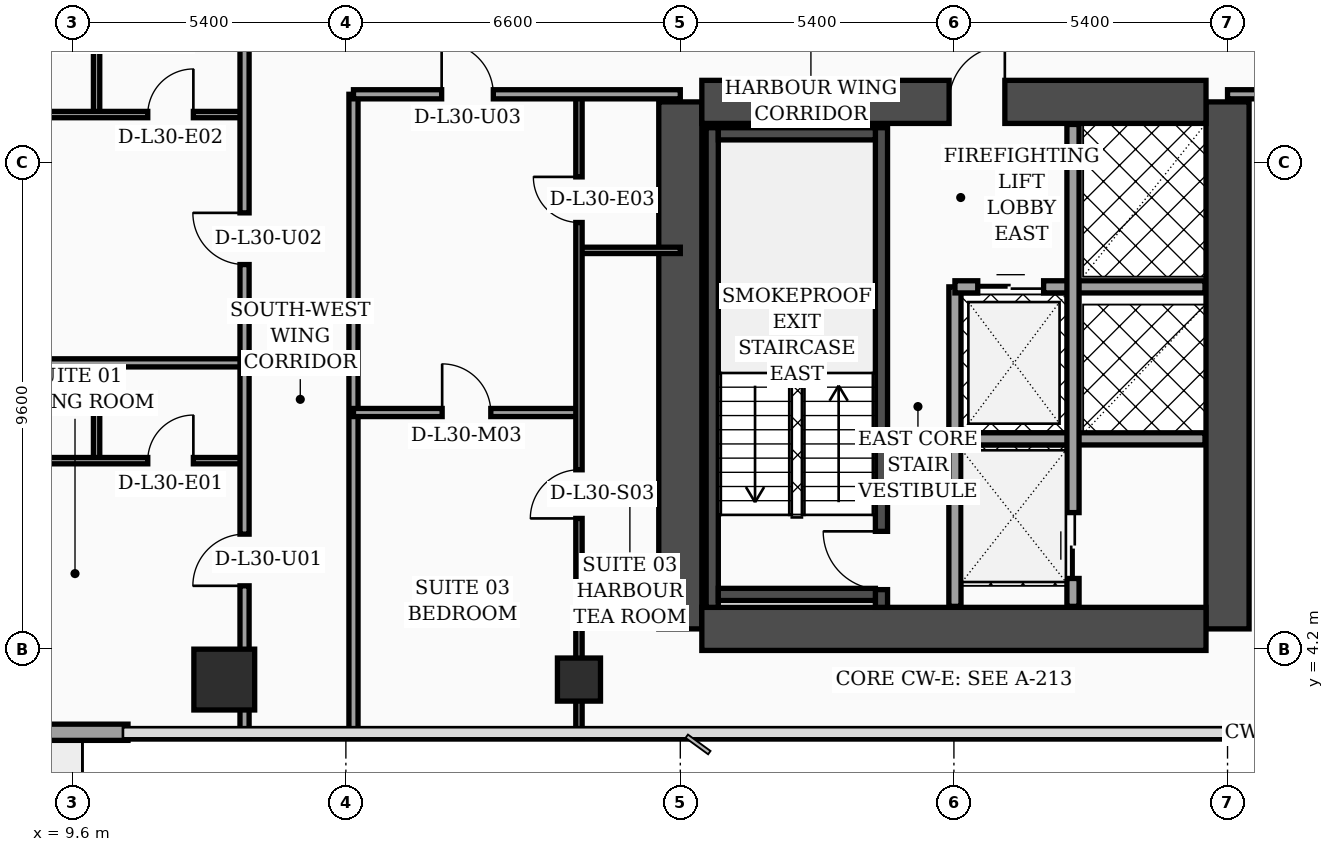
"""IFC4 building model, lengths in metres.
Left out: names, types, materials, properties, quantities, classifications, styles, units other than length and angle.
Written with IfcOpenShell. Run it as: python <this file> out.ifc"""

import sys

from ifc_helpers import new_model, si_unit, direction, frame, frame_2d, origin, origin_2d, place, context, subcontext, project, spatial, rectangle, hollow_rectangle, extrude, element, fill, save


model = new_model("IFC4")
c1 = context("Model", 3, precision=1e-05, world=origin(), true_north=direction((0.0, 1.0)))
c2 = subcontext(c1, "Body", "Model", "MODEL_VIEW")
j1 = project(units=[si_unit("LENGTHUNIT", "METRE"), si_unit("PLANEANGLEUNIT", "RADIAN")], contexts=[c1])
p1 = place(None, origin())
s1 = spatial("IfcSite", under=j1, at=p1, CompositionType="ELEMENT")
p2 = place(p1, origin())
s2 = spatial("IfcBuilding", under=s1, at=p2, CompositionType="ELEMENT")
p3 = place(p2, frame((0.0, 0.0, 124.0)))
s3 = spatial("IfcBuildingStorey", under=s2, at=p3, CompositionType="ELEMENT", Elevation=124.0)
for number, where, z_axis, x_axis in (
    (1, (21.6, 4.6, 0.0), (0.0, 0.0, 1.0), (0.0, 1.0, 0.0)),
    (2, (32.4, 4.6, 0.0), (0.0, 0.0, 1.0), (0.0, 1.0, 0.0)),
):
    element("IfcWall", number, at=place(p3, frame(where, z_axis=z_axis, x_axis=x_axis)), inside=s3, PredefinedType="SHEAR", context=c2, shape_type="SweptSolid", body=[
        extrude(rectangle(XDim=10.4, YDim=0.85, at=frame_2d((5.2, 0.0))), origin(), (0.0, 0.0, 1.0), 3.56),
    ])
p4 = place(p3, frame((22.025, 15.0, 0.0), z_axis=(0.0, 0.0, 1.0), x_axis=(1.0, 0.0, 0.0)))
e3 = element("IfcWall", 3, at=p4, inside=s3, PredefinedType="SHEAR", context=c2, shape_type="SweptSolid", body=[
    extrude(rectangle(XDim=9.95, YDim=0.85, at=frame_2d((4.975, 0.0))), origin(), (0.0, 0.0, 1.0), 3.56),
])
p5 = place(p4, frame((4.88, 0.0, 0.0)))
e4 = element("IfcOpeningElement", 4, at=p5, cuts=e3, PredefinedType="OPENING", context=c2, shape_type="SweptSolid", body=[
    extrude(rectangle(XDim=1.1, YDim=2.2, at=frame_2d((0.55, 1.1))), frame((0.0, 0.435, 0.0), z_axis=(0.0, -1.0, 0.0), x_axis=(1.0, 0.0, 0.0)), (0.0, 0.0, 1.0), 0.87),
])
p6 = place(p3, frame((22.025, 4.6, 0.0), z_axis=(0.0, 0.0, 1.0), x_axis=(1.0, 0.0, 0.0)))
e5 = element("IfcWall", 5, at=p6, inside=s3, PredefinedType="SHEAR", context=c2, shape_type="SweptSolid", body=[
    extrude(rectangle(XDim=9.95, YDim=0.85, at=frame_2d((4.975, 0.0))), origin(), (0.0, 0.0, 1.0), 3.56),
])
p7 = place(p3, frame((22.23, 5.025, 0.0), z_axis=(0.0, 0.0, 1.0), x_axis=(0.0, 1.0, 0.0)))
e6 = element("IfcWall", 6, at=p7, inside=s3, PredefinedType="SOLIDWALL", context=c2, shape_type="SweptSolid", body=[
    extrude(rectangle(XDim=9.465, YDim=0.24, at=frame_2d((4.732, 0.0))), origin(), (0.0, 0.0, 1.0), 3.56),
])
p8 = place(p3, frame((25.57, 5.025, 0.0), z_axis=(0.0, 0.0, 1.0), x_axis=(0.0, 1.0, 0.0)))
e7 = element("IfcWall", 7, at=p8, inside=s3, PredefinedType="SOLIDWALL", context=c2, shape_type="SweptSolid", body=[
    extrude(rectangle(XDim=9.465, YDim=0.24, at=frame_2d((4.732, 0.0))), origin(), (0.0, 0.0, 1.0), 3.56),
])
p9 = place(p8, frame((0.35, 0.0, 0.0)))
e8 = element("IfcOpeningElement", 8, at=p9, cuts=e7, PredefinedType="OPENING", context=c2, shape_type="SweptSolid", body=[
    extrude(rectangle(XDim=1.15, YDim=2.2, at=frame_2d((0.575, 1.1))), frame((0.0, 0.13, 0.0), z_axis=(0.0, -1.0, 0.0), x_axis=(1.0, 0.0, 0.0)), (0.0, 0.0, 1.0), 0.26),
])
for number, where, z_axis, x_axis in (
    (9, (22.35, 5.28, 0.0), (0.0, 0.0, 1.0), (1.0, 0.0, 0.0)),
    (10, (22.35, 14.37, 0.0), (0.0, 0.0, 1.0), (1.0, 0.0, 0.0)),
):
    element("IfcWall", number, at=place(p3, frame(where, z_axis=z_axis, x_axis=x_axis)), inside=s3, PredefinedType="SOLIDWALL", context=c2, shape_type="SweptSolid", body=[
        extrude(rectangle(XDim=3.1, YDim=0.24, at=frame_2d((1.55, 0.0))), origin(), (0.0, 0.0, 1.0), 3.56),
    ])
p10 = place(p3, frame((12.6, 3.6, 0.0), z_axis=(0.0, 0.0, 1.0), x_axis=(1.0, 0.0, 0.0)))
e11 = element("IfcColumn", 11, at=p10, inside=s3, PredefinedType="COLUMN", context=c2, shape_type="SweptSolid", body=[
    extrude(rectangle(XDim=1.2, YDim=1.2, at=origin_2d()), origin(), (0.0, 0.0, 1.0), 3.56),
])
p11 = place(p3, frame((19.6, 3.6, 0.0), z_axis=(0.0, 0.0, 1.0), x_axis=(1.0, 0.0, 0.0)))
e12 = element("IfcColumn", 12, at=p11, inside=s3, PredefinedType="COLUMN", context=c2, shape_type="SweptSolid", body=[
    extrude(hollow_rectangle(XDim=0.85, YDim=0.85, WallThickness=0.036, at=origin_2d()), origin(), (0.0, 0.0, 1.0), 3.56),
])
p12 = place(p3, frame((3.1, 2.56, 0.0), z_axis=(0.0, 0.0, 1.0), x_axis=(1.0, 0.0, 0.0)))
e13 = element("IfcWall", 13, at=p12, inside=s3, PredefinedType="SOLIDWALL", context=c2, shape_type="SweptSolid", body=[
    extrude(rectangle(XDim=7.6, YDim=0.32, at=frame_2d((3.8, 0.0))), origin(), (0.0, 0.0, 1.0), 3.56),
])
p13 = place(p12, frame((0.45, 0.0, 0.75)))
e14 = element("IfcOpeningElement", 14, at=p13, cuts=e13, PredefinedType="OPENING", context=c2, shape_type="SweptSolid", body=[
    extrude(rectangle(XDim=1.0, YDim=1.6, at=frame_2d((0.5, 0.8))), frame((0.0, 0.17, 0.0), z_axis=(0.0, -1.0, 0.0), x_axis=(1.0, 0.0, 0.0)), (0.0, 0.0, 1.0), 0.34),
])
p14 = place(p12, frame((3.8, 0.0, 0.0)))
e15 = element("IfcOpeningElement", 15, at=p14, cuts=e13, PredefinedType="OPENING", context=c2, shape_type="SweptSolid", body=[
    extrude(rectangle(XDim=1.4, YDim=2.25, at=frame_2d((0.7, 1.125))), frame((0.0, 0.17, 0.0), z_axis=(0.0, -1.0, 0.0), x_axis=(1.0, 0.0, 0.0)), (0.0, 0.0, 1.0), 0.34),
])
p15 = place(p3, frame((27.02, 5.045, 0.0), z_axis=(0.0, 0.0, 1.0), x_axis=(0.0, 1.0, 0.0)))
e16 = element("IfcWall", 16, at=p15, inside=s3, PredefinedType="SOLIDWALL", context=c2, shape_type="SweptSolid", body=[
    extrude(rectangle(XDim=6.305, YDim=0.24, at=frame_2d((3.153, 0.0))), origin(), (0.0, 0.0, 1.0), 3.56),
])
p16 = place(p3, frame((27.02, 11.35, 0.0), z_axis=(0.0, 0.0, 1.0), x_axis=(1.0, 0.0, 0.0)))
e17 = element("IfcWall", 17, at=p16, inside=s3, PredefinedType="SOLIDWALL", context=c2, shape_type="SweptSolid", body=[
    extrude(rectangle(XDim=4.935, YDim=0.24, at=frame_2d((2.468, 0.0))), origin(), (0.0, 0.0, 1.0), 3.56),
])
p17 = place(p16, frame((0.45, 0.0, 0.0)))
e18 = element("IfcOpeningElement", 18, at=p17, cuts=e17, PredefinedType="OPENING", context=c2, shape_type="SweptSolid", body=[
    extrude(rectangle(XDim=1.3, YDim=2.35, at=frame_2d((0.65, 1.175))), frame((0.0, 0.13, 0.0), z_axis=(0.0, -1.0, 0.0), x_axis=(1.0, 0.0, 0.0)), (0.0, 0.0, 1.0), 0.26),
])
p18 = place(p3, frame((27.02, 8.35, 0.0), z_axis=(0.0, 0.0, 1.0), x_axis=(1.0, 0.0, 0.0)))
e19 = element("IfcWall", 19, at=p18, inside=s3, PredefinedType="SOLIDWALL", context=c2, shape_type="SweptSolid", body=[
    extrude(rectangle(XDim=4.935, YDim=0.24, at=frame_2d((2.468, 0.0))), origin(), (0.0, 0.0, 1.0), 3.56),
])
p19 = place(p3, frame((29.35, 5.045, 0.0), z_axis=(0.0, 0.0, 1.0), x_axis=(0.0, 1.0, 0.0)))
e20 = element("IfcWall", 20, at=p19, inside=s3, PredefinedType="SOLIDWALL", context=c2, shape_type="SweptSolid", body=[
    extrude(rectangle(XDim=9.51, YDim=0.24, at=frame_2d((4.755, 0.0))), origin(), (0.0, 0.0, 1.0), 3.56),
])
p20 = place(p19, frame((0.55, 0.0, 0.0)))
e21 = element("IfcOpeningElement", 21, at=p20, cuts=e20, PredefinedType="OPENING", context=c2, shape_type="SweptSolid", body=[
    extrude(rectangle(XDim=1.3, YDim=2.35, at=frame_2d((0.65, 1.175))), frame((0.0, 0.13, 0.0), z_axis=(0.0, -1.0, 0.0), x_axis=(1.0, 0.0, 0.0)), (0.0, 0.0, 1.0), 0.26),
])
p21 = place(p3, frame((10.08, 7.92, 0.0), z_axis=(0.0, 0.0, 1.0), x_axis=(0.0, 1.0, 0.0)))
e22 = element("IfcWall", 22, at=p21, inside=s3, PredefinedType="PARTITIONING", context=c2, shape_type="SweptSolid", body=[
    extrude(rectangle(XDim=1.93, YDim=0.125, at=frame_2d((0.965, 0.0))), origin(), (0.0, 0.0, 1.0), 3.09),
])
p22 = place(p3, frame((3.2, 7.92, 0.0), z_axis=(0.0, 0.0, 1.0), x_axis=(1.0, 0.0, 0.0)))
e23 = element("IfcWall", 23, at=p22, inside=s3, PredefinedType="PARTITIONING", context=c2, shape_type="SweptSolid", body=[
    extrude(rectangle(XDim=9.8, YDim=0.125, at=frame_2d((4.9, 0.0))), origin(), (0.0, 0.0, 1.0), 2.84),
])
p23 = place(p22, frame((3.32, 0.0, 0.0)))
e24 = element("IfcOpeningElement", 24, at=p23, cuts=e23, PredefinedType="OPENING", context=c2, shape_type="SweptSolid", body=[
    extrude(rectangle(XDim=0.96, YDim=2.2, at=frame_2d((0.48, 1.1))), frame((0.0, 0.073, 0.0), z_axis=(0.0, -1.0, 0.0), x_axis=(1.0, 0.0, 0.0)), (0.0, 0.0, 1.0), 0.145),
])
p24 = place(p22, frame((7.89, 0.0, 0.0)))
e25 = element("IfcOpeningElement", 25, at=p24, cuts=e23, PredefinedType="OPENING", context=c2, shape_type="SweptSolid", body=[
    extrude(rectangle(XDim=0.9, YDim=2.15, at=frame_2d((0.45, 1.075))), frame((0.0, 0.073, 0.0), z_axis=(0.0, -1.0, 0.0), x_axis=(1.0, 0.0, 0.0)), (0.0, 0.0, 1.0), 0.145),
])
p25 = place(p3, frame((10.08, 14.75, 0.0), z_axis=(0.0, 0.0, 1.0), x_axis=(0.0, 1.0, 0.0)))
e26 = element("IfcWall", 26, at=p25, inside=s3, PredefinedType="PARTITIONING", context=c2, shape_type="SweptSolid", body=[
    extrude(rectangle(XDim=2.05, YDim=0.125, at=frame_2d((1.025, 0.0))), origin(), (0.0, 0.0, 1.0), 3.56),
])
p26 = place(p3, frame((0.08, 14.75, 0.0), z_axis=(0.0, 0.0, 1.0), x_axis=(1.0, 0.0, 0.0)))
e27 = element("IfcWall", 27, at=p26, inside=s3, PredefinedType="PARTITIONING", context=c2, shape_type="SweptSolid", body=[
    extrude(rectangle(XDim=12.92, YDim=0.125, at=frame_2d((6.46, 0.0))), origin(), (0.0, 0.0, 1.0), 2.84),
])
p27 = place(p26, frame((4.52, 0.0, 0.0)))
e28 = element("IfcOpeningElement", 28, at=p27, cuts=e27, PredefinedType="OPENING", context=c2, shape_type="SweptSolid", body=[
    extrude(rectangle(XDim=0.96, YDim=2.2, at=frame_2d((0.48, 1.1))), frame((0.0, 0.073, 0.0), z_axis=(0.0, -1.0, 0.0), x_axis=(1.0, 0.0, 0.0)), (0.0, 0.0, 1.0), 0.145),
])
p28 = place(p26, frame((11.01, 0.0, 0.0)))
e29 = element("IfcOpeningElement", 29, at=p28, cuts=e27, PredefinedType="OPENING", context=c2, shape_type="SweptSolid", body=[
    extrude(rectangle(XDim=0.9, YDim=2.15, at=frame_2d((0.45, 1.075))), frame((0.0, 0.073, 0.0), z_axis=(0.0, -1.0, 0.0), x_axis=(1.0, 0.0, 0.0)), (0.0, 0.0, 1.0), 0.145),
])
p29 = place(p3, frame((0.08, 9.85, 0.0), z_axis=(0.0, 0.0, 1.0), x_axis=(1.0, 0.0, 0.0)))
e30 = element("IfcWall", 30, at=p29, inside=s3, PredefinedType="PARTITIONING", context=c2, shape_type="SweptSolid", body=[
    extrude(rectangle(XDim=12.92, YDim=0.16, at=frame_2d((6.46, 0.0))), origin(), (0.0, 0.0, 1.0), 2.84),
])
p30 = place(p3, frame((13.0, 2.44, 0.0), z_axis=(0.0, 0.0, 1.0), x_axis=(0.0, 1.0, 0.0)))
e31 = element("IfcWall", 31, at=p30, inside=s3, PredefinedType="PARTITIONING", context=c2, shape_type="SweptSolid", body=[
    extrude(rectangle(XDim=14.36, YDim=0.18, at=frame_2d((7.18, 0.0))), origin(), (0.0, 0.0, 1.0), 2.84),
])
p31 = place(p30, frame((3.01, 0.0, 0.0)))
e32 = element("IfcOpeningElement", 32, at=p31, cuts=e31, PredefinedType="OPENING", context=c2, shape_type="SweptSolid", body=[
    extrude(rectangle(XDim=1.02, YDim=2.2, at=frame_2d((0.51, 1.1))), frame((0.0, 0.1, 0.0), z_axis=(0.0, -1.0, 0.0), x_axis=(1.0, 0.0, 0.0)), (0.0, 0.0, 1.0), 0.2),
])
p32 = place(p30, frame((9.35, 0.0, 0.0)))
e33 = element("IfcOpeningElement", 33, at=p32, cuts=e31, PredefinedType="OPENING", context=c2, shape_type="SweptSolid", body=[
    extrude(rectangle(XDim=1.02, YDim=2.2, at=frame_2d((0.51, 1.1))), frame((0.0, 0.1, 0.0), z_axis=(0.0, -1.0, 0.0), x_axis=(1.0, 0.0, 0.0)), (0.0, 0.0, 1.0), 0.2),
])
p33 = place(p3, frame((15.15, 2.44, 0.0), z_axis=(0.0, 0.0, 1.0), x_axis=(0.0, 1.0, 0.0)))
e34 = element("IfcWall", 34, at=p33, inside=s3, PredefinedType="PARTITIONING", context=c2, shape_type="SweptSolid", body=[
    extrude(rectangle(XDim=12.71, YDim=0.18, at=frame_2d((6.355, 0.0))), origin(), (0.0, 0.0, 1.0), 3.04),
])
p34 = place(p3, frame((19.6, 12.07, 0.0), z_axis=(0.0, 0.0, 1.0), x_axis=(1.0, 0.0, 0.0)))
e35 = element("IfcWall", 35, at=p34, inside=s3, PredefinedType="PARTITIONING", context=c2, shape_type="SweptSolid", body=[
    extrude(rectangle(XDim=2.0, YDim=0.125, at=frame_2d((1.0, 0.0))), origin(), (0.0, 0.0, 1.0), 3.56),
])
p35 = place(p3, frame((15.15, 8.87, 0.0), z_axis=(0.0, 0.0, 1.0), x_axis=(1.0, 0.0, 0.0)))
e36 = element("IfcWall", 36, at=p35, inside=s3, PredefinedType="PARTITIONING", context=c2, shape_type="SweptSolid", body=[
    extrude(rectangle(XDim=4.45, YDim=0.16, at=frame_2d((2.225, 0.0))), origin(), (0.0, 0.0, 1.0), 3.56),
])
p36 = place(p35, frame((1.75, 0.0, 0.0)))
e37 = element("IfcOpeningElement", 37, at=p36, cuts=e36, PredefinedType="OPENING", context=c2, shape_type="SweptSolid", body=[
    extrude(rectangle(XDim=0.96, YDim=2.2, at=frame_2d((0.48, 1.1))), frame((0.0, 0.09, 0.0), z_axis=(0.0, -1.0, 0.0), x_axis=(1.0, 0.0, 0.0)), (0.0, 0.0, 1.0), 0.18),
])
p37 = place(p3, frame((19.6, 2.44, 0.0), z_axis=(0.0, 0.0, 1.0), x_axis=(0.0, 1.0, 0.0)))
e38 = element("IfcWall", 38, at=p37, inside=s3, PredefinedType="PARTITIONING", context=c2, shape_type="SweptSolid", body=[
    extrude(rectangle(XDim=12.71, YDim=0.125, at=frame_2d((6.355, 0.0))), origin(), (0.0, 0.0, 1.0), 2.49),
])
p38 = place(p37, frame((4.34, 0.0, 0.0)))
e39 = element("IfcOpeningElement", 39, at=p38, cuts=e38, PredefinedType="OPENING", context=c2, shape_type="SweptSolid", body=[
    extrude(rectangle(XDim=0.96, YDim=2.2, at=frame_2d((0.48, 1.1))), frame((0.0, 0.073, 0.0), z_axis=(0.0, -1.0, 0.0), x_axis=(1.0, 0.0, 0.0)), (0.0, 0.0, 1.0), 0.145),
])
p39 = place(p37, frame((10.18, 0.0, 0.0)))
e40 = element("IfcOpeningElement", 40, at=p39, cuts=e38, PredefinedType="OPENING", context=c2, shape_type="SweptSolid", body=[
    extrude(rectangle(XDim=0.9, YDim=2.15, at=frame_2d((0.45, 1.075))), frame((0.0, 0.073, 0.0), z_axis=(0.0, -1.0, 0.0), x_axis=(1.0, 0.0, 0.0)), (0.0, 0.0, 1.0), 0.145),
])
p40 = place(p3, frame((15.15, 15.15, 0.0), z_axis=(0.0, 0.0, 1.0), x_axis=(1.0, 0.0, 0.0)))
e41 = element("IfcWall", 41, at=p40, inside=s3, PredefinedType="PARTITIONING", context=c2, shape_type="SweptSolid", body=[
    extrude(rectangle(XDim=6.45, YDim=0.18, at=frame_2d((3.225, 0.0))), origin(), (0.0, 0.0, 1.0), 2.49),
])
p41 = place(p40, frame((1.74, 0.0, 0.0)))
e42 = element("IfcOpeningElement", 42, at=p41, cuts=e41, PredefinedType="OPENING", context=c2, shape_type="SweptSolid", body=[
    extrude(rectangle(XDim=1.02, YDim=2.2, at=frame_2d((0.51, 1.1))), frame((0.0, 0.1, 0.0), z_axis=(0.0, -1.0, 0.0), x_axis=(1.0, 0.0, 0.0)), (0.0, 0.0, 1.0), 0.2),
])
p42 = place(p3, frame((32.4, 15.15, 0.0), z_axis=(0.0, 0.0, 1.0), x_axis=(1.0, 0.0, 0.0)))
e43 = element("IfcWall", 43, at=p42, inside=s3, PredefinedType="PARTITIONING", context=c2, shape_type="SweptSolid", body=[
    extrude(rectangle(XDim=16.95, YDim=0.18, at=frame_2d((8.475, 0.0))), origin(), (0.0, 0.0, 1.0), 2.84),
])
p43 = place(p42, frame((1.1, 0.0, 0.0)))
e44 = element("IfcOpeningElement", 44, at=p43, cuts=e43, PredefinedType="OPENING", context=c2, shape_type="SweptSolid", body=[
    extrude(rectangle(XDim=1.5, YDim=2.22, at=frame_2d((0.75, 1.11))), frame((0.0, 0.1, 0.0), z_axis=(0.0, -1.0, 0.0), x_axis=(1.0, 0.0, 0.0)), (0.0, 0.0, 1.0), 0.2),
])
p44 = place(p42, frame((6.78, 0.0, 0.0)))
e45 = element("IfcOpeningElement", 45, at=p44, cuts=e43, PredefinedType="OPENING", context=c2, shape_type="SweptSolid", body=[
    extrude(rectangle(XDim=1.02, YDim=2.2, at=frame_2d((0.51, 1.1))), frame((0.0, 0.1, 0.0), z_axis=(0.0, -1.0, 0.0), x_axis=(1.0, 0.0, 0.0)), (0.0, 0.0, 1.0), 0.2),
])
p45 = place(p42, frame((12.69, 0.0, 0.0)))
e46 = element("IfcOpeningElement", 46, at=p45, cuts=e43, PredefinedType="OPENING", context=c2, shape_type="SweptSolid", body=[
    extrude(rectangle(XDim=1.02, YDim=2.2, at=frame_2d((0.51, 1.1))), frame((0.0, 0.1, 0.0), z_axis=(0.0, -1.0, 0.0), x_axis=(1.0, 0.0, 0.0)), (0.0, 0.0, 1.0), 0.2),
])
p46 = place(p17, origin())
e47 = element("IfcDoor", 47, at=p46, inside=s3, OperationType="DOUBLE_DOOR_SLIDING", PredefinedType="DOOR", context=c2, shape_type="SweptSolid", body=[
    extrude(rectangle(XDim=1.3, YDim=2.35, at=frame_2d((0.65, 1.175))), frame((0.0, 0.025, 0.0), z_axis=(0.0, -1.0, 0.0), x_axis=(1.0, 0.0, 0.0)), (0.0, 0.0, 1.0), 0.05),
])
fill(e18, e47)
p47 = place(p20, origin())
e48 = element("IfcDoor", 48, at=p47, inside=s3, OperationType="DOUBLE_DOOR_SLIDING", PredefinedType="DOOR", context=c2, shape_type="SweptSolid", body=[
    extrude(rectangle(XDim=1.3, YDim=2.35, at=frame_2d((0.65, 1.175))), frame((0.0, 0.025, 0.0), z_axis=(0.0, -1.0, 0.0), x_axis=(1.0, 0.0, 0.0)), (0.0, 0.0, 1.0), 0.05),
])
fill(e21, e48)
p48 = place(p24, origin())
e49 = element("IfcDoor", 49, at=p48, inside=s3, OperationType="SINGLE_SWING_RIGHT", PredefinedType="DOOR", context=c2, shape_type="SweptSolid", body=[
    extrude(rectangle(XDim=0.9, YDim=2.15, at=frame_2d((0.45, 1.075))), frame((0.0, 0.025, 0.0), z_axis=(0.0, -1.0, 0.0), x_axis=(1.0, 0.0, 0.0)), (0.0, 0.0, 1.0), 0.05),
])
fill(e25, e49)
p49 = place(p28, origin())
e50 = element("IfcDoor", 50, at=p49, inside=s3, OperationType="SINGLE_SWING_RIGHT", PredefinedType="DOOR", context=c2, shape_type="SweptSolid", body=[
    extrude(rectangle(XDim=0.9, YDim=2.15, at=frame_2d((0.45, 1.075))), frame((0.0, 0.025, 0.0), z_axis=(0.0, -1.0, 0.0), x_axis=(1.0, 0.0, 0.0)), (0.0, 0.0, 1.0), 0.05),
])
fill(e29, e50)
p50 = place(p31, origin())
e51 = element("IfcDoor", 51, at=p50, inside=s3, OperationType="SINGLE_SWING_LEFT", PredefinedType="DOOR", context=c2, shape_type="SweptSolid", body=[
    extrude(rectangle(XDim=1.02, YDim=2.2, at=frame_2d((0.51, 1.1))), frame((0.0, 0.025, 0.0), z_axis=(0.0, -1.0, 0.0), x_axis=(1.0, 0.0, 0.0)), (0.0, 0.0, 1.0), 0.05),
])
fill(e32, e51)
p51 = place(p32, origin())
e52 = element("IfcDoor", 52, at=p51, inside=s3, OperationType="SINGLE_SWING_RIGHT", PredefinedType="DOOR", context=c2, shape_type="SweptSolid", body=[
    extrude(rectangle(XDim=1.02, YDim=2.2, at=frame_2d((0.51, 1.1))), frame((0.0, 0.025, 0.0), z_axis=(0.0, -1.0, 0.0), x_axis=(1.0, 0.0, 0.0)), (0.0, 0.0, 1.0), 0.05),
])
fill(e33, e52)
p52 = place(p36, origin())
e53 = element("IfcDoor", 53, at=p52, inside=s3, OperationType="SINGLE_SWING_LEFT", PredefinedType="DOOR", context=c2, shape_type="SweptSolid", body=[
    extrude(rectangle(XDim=0.96, YDim=2.2, at=frame_2d((0.48, 1.1))), frame((0.0, 0.025, 0.0), z_axis=(0.0, -1.0, 0.0), x_axis=(1.0, 0.0, 0.0)), (0.0, 0.0, 1.0), 0.05),
])
fill(e37, e53)
p53 = place(p38, origin())
e54 = element("IfcDoor", 54, at=p53, inside=s3, OperationType="SINGLE_SWING_LEFT", PredefinedType="DOOR", context=c2, shape_type="SweptSolid", body=[
    extrude(rectangle(XDim=0.96, YDim=2.2, at=frame_2d((0.48, 1.1))), frame((0.0, 0.025, 0.0), z_axis=(0.0, -1.0, 0.0), x_axis=(1.0, 0.0, 0.0)), (0.0, 0.0, 1.0), 0.05),
])
fill(e39, e54)
p54 = place(p39, origin())
e55 = element("IfcDoor", 55, at=p54, inside=s3, OperationType="SINGLE_SWING_RIGHT", PredefinedType="DOOR", context=c2, shape_type="SweptSolid", body=[
    extrude(rectangle(XDim=0.9, YDim=2.15, at=frame_2d((0.45, 1.075))), frame((0.0, 0.025, 0.0), z_axis=(0.0, -1.0, 0.0), x_axis=(1.0, 0.0, 0.0)), (0.0, 0.0, 1.0), 0.05),
])
fill(e40, e55)
p55 = place(p41, origin())
e56 = element("IfcDoor", 56, at=p55, inside=s3, OperationType="SINGLE_SWING_LEFT", PredefinedType="DOOR", context=c2, shape_type="SweptSolid", body=[
    extrude(rectangle(XDim=1.02, YDim=2.2, at=frame_2d((0.51, 1.1))), frame((0.0, 0.025, 0.0), z_axis=(0.0, -1.0, 0.0), x_axis=(1.0, 0.0, 0.0)), (0.0, 0.0, 1.0), 0.05),
])
fill(e42, e56)
p56 = place(p9, origin())
e57 = element("IfcDoor", 57, at=p56, inside=s3, OperationType="SINGLE_SWING_RIGHT", PredefinedType="DOOR", context=c2, shape_type="SweptSolid", body=[
    extrude(rectangle(XDim=1.15, YDim=2.2, at=frame_2d((0.575, 1.1))), frame((0.0, 0.025, 0.0), z_axis=(0.0, -1.0, 0.0), x_axis=(1.0, 0.0, 0.0)), (0.0, 0.0, 1.0), 0.05),
])
fill(e8, e57)
p57 = place(p5, origin())
e58 = element("IfcDoor", 58, at=p57, inside=s3, OperationType="SINGLE_SWING_RIGHT", PredefinedType="DOOR", context=c2, shape_type="SweptSolid", body=[
    extrude(rectangle(XDim=1.1, YDim=2.2, at=frame_2d((0.55, 1.1))), frame((0.0, 0.025, 0.0), z_axis=(0.0, -1.0, 0.0), x_axis=(1.0, 0.0, 0.0)), (0.0, 0.0, 1.0), 0.05),
])
fill(e4, e58)
save(model, sys.argv[1])
